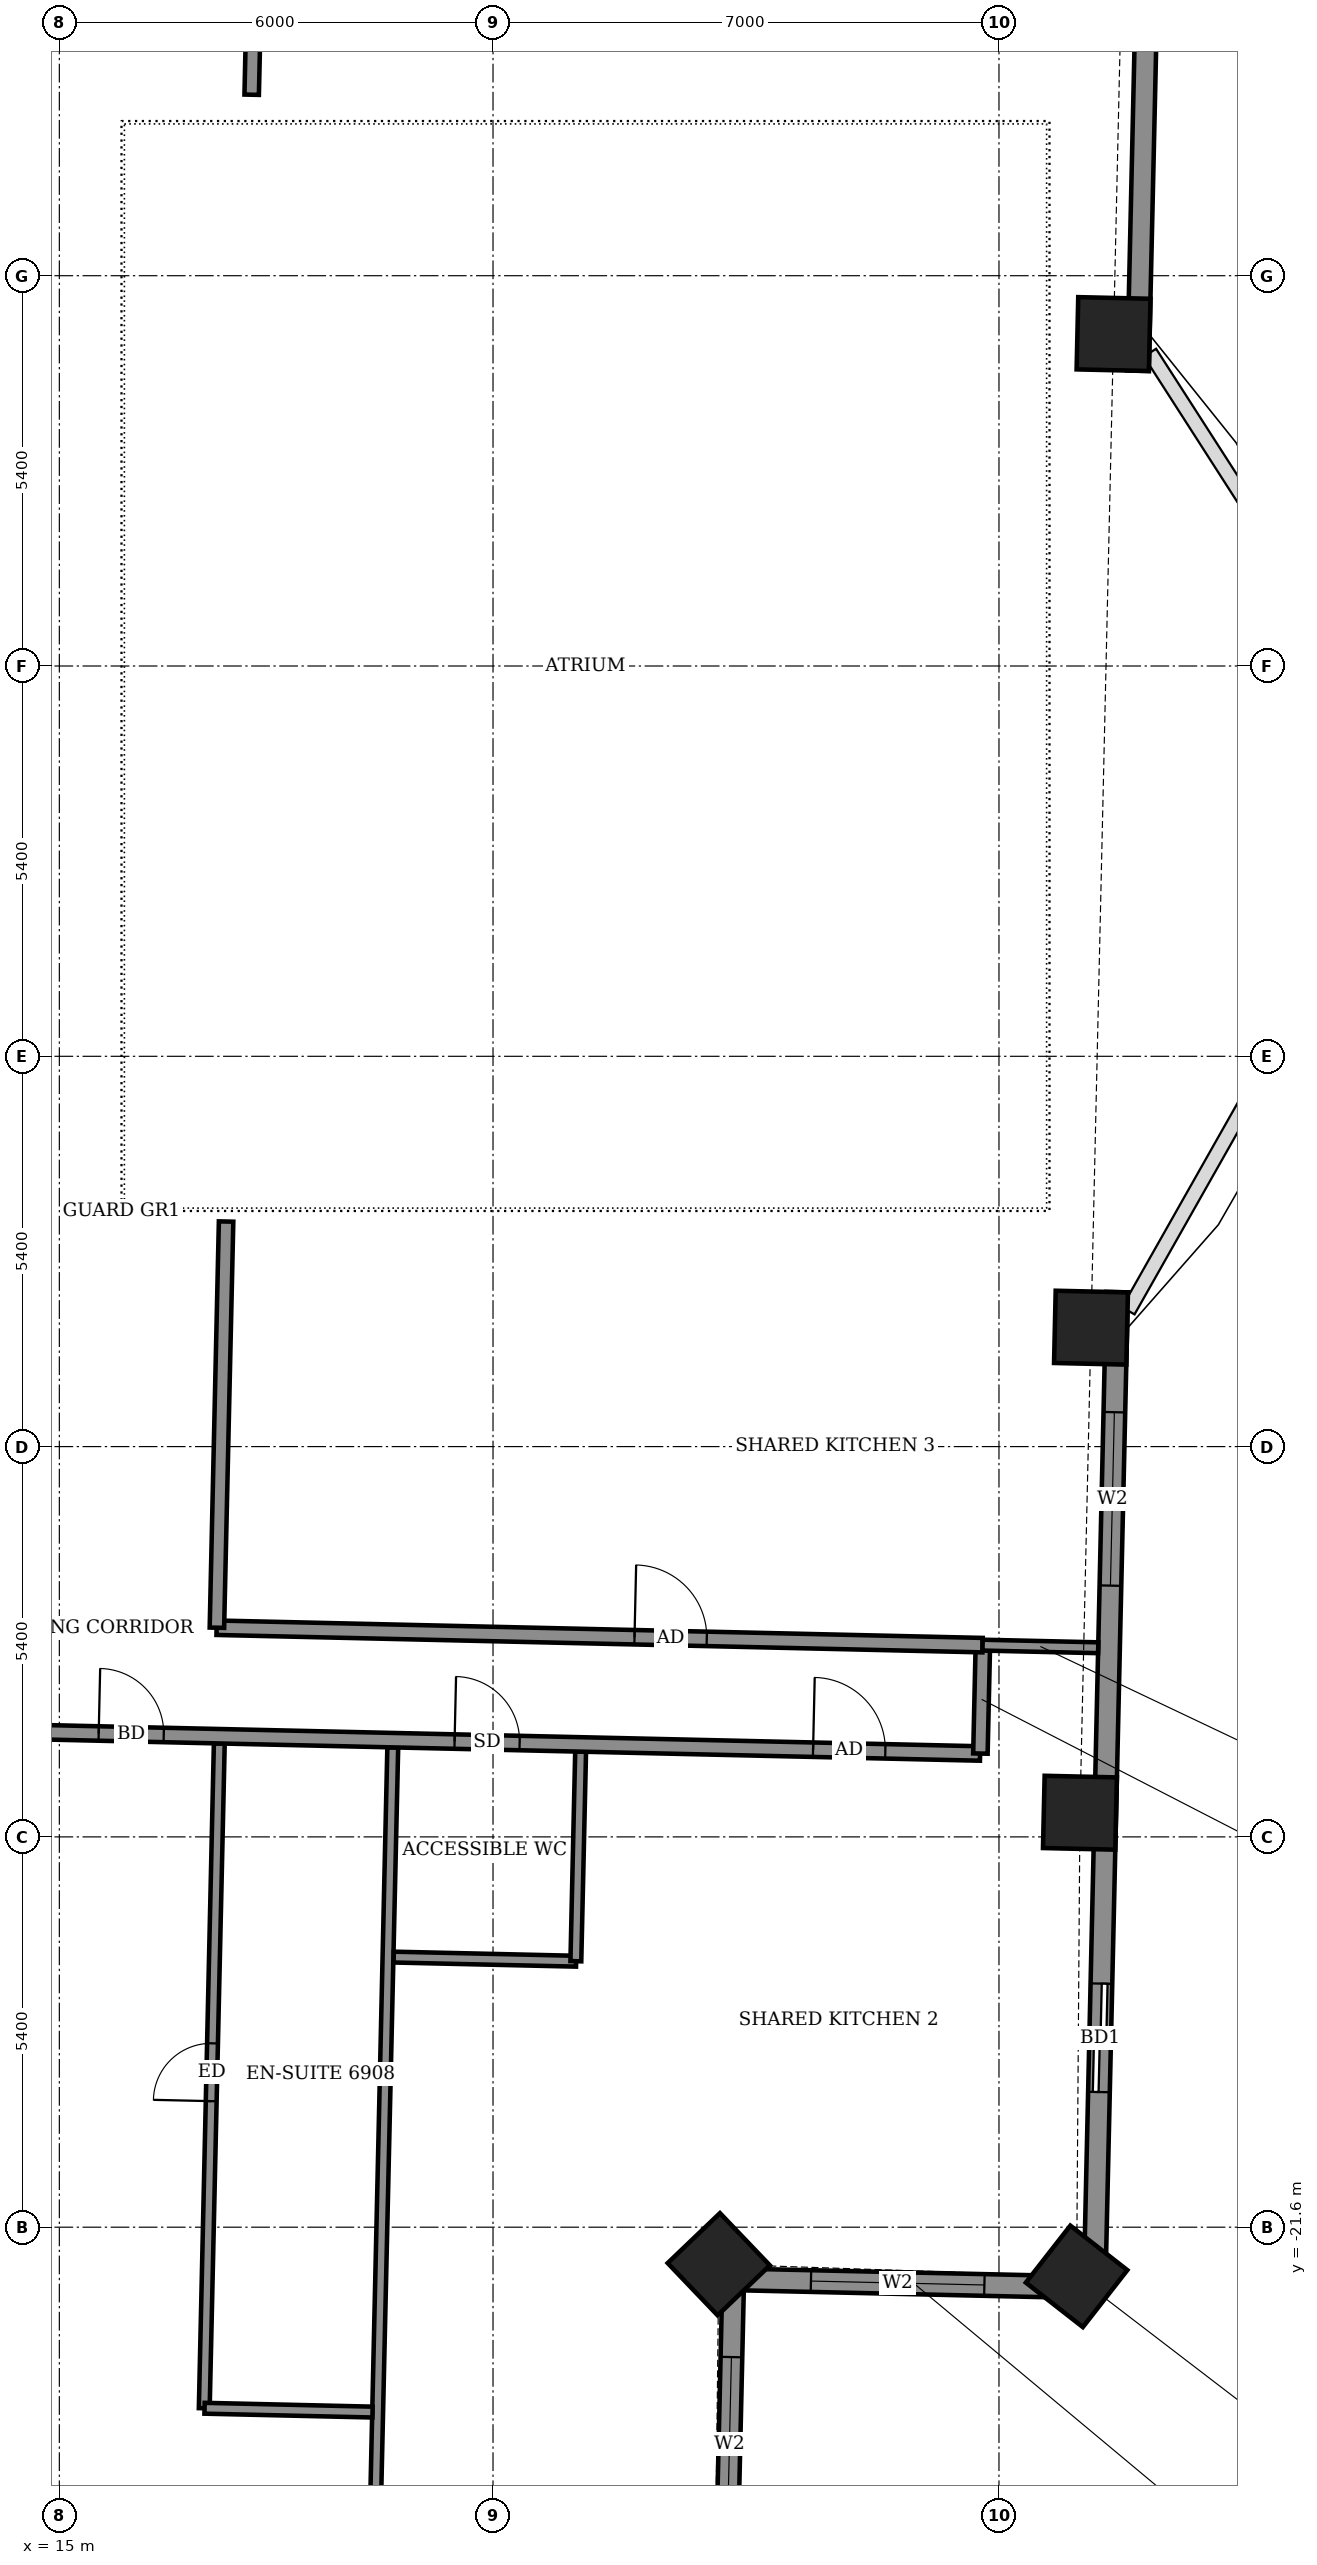
"""IFC4 building model, lengths in metres.
Left out: names, types, materials, properties, quantities, classifications, styles, units other than length and angle.
Written with IfcOpenShell. Run it as: python <this file> out.ifc"""

import sys

from ifc_helpers import new_model, si_unit, direction, frame, frame_2d, origin, origin_2d, place, context, subcontext, project, spatial, rectangle, extrude, element, fill, save


model = new_model("IFC4")
c1 = context("Model", 3, precision=1e-05, world=origin(), true_north=direction((0.0, 1.0)))
c2 = subcontext(c1, "Body", "Model", "MODEL_VIEW")
j1 = project(units=[si_unit("LENGTHUNIT", "METRE"), si_unit("PLANEANGLEUNIT", "RADIAN")], contexts=[c1])
p1 = place(None, origin())
s1 = spatial("IfcSite", under=j1, at=p1, CompositionType="ELEMENT")
p2 = place(p1, origin())
s2 = spatial("IfcBuilding", under=s1, at=p2, CompositionType="ELEMENT")
p3 = place(p2, frame((0.0, 0.0, 271.7)))
s3 = spatial("IfcBuildingStorey", under=s2, at=p3, CompositionType="ELEMENT", Elevation=271.7)
for number, where, z_axis, x_axis in (
    (1, (24.124, -22.113, -0.55), (0.0, 0.0, 1.0), (0.723, 0.691, 0.0)),
    (2, (29.074, -22.28, -0.55), (0.0, 0.0, 1.0), (0.615, 0.788, 0.0)),
    (3, (29.12, -15.866, -0.55), (0.0, 0.0, 1.0), (0.023, 1.0, 0.0)),
    (4, (29.273, -9.155, -0.55), (0.0, 0.0, 1.0), (0.023, 1.0, 0.0)),
    (5, (29.585, 4.592, -0.55), (0.0, 0.0, 1.0), (0.023, 1.0, 0.0)),
):
    element("IfcColumn", number, at=place(p3, frame(where, z_axis=z_axis, x_axis=x_axis)), inside=s3, PredefinedType="COLUMN", context=c2, shape_type="SweptSolid", body=[
        extrude(rectangle(XDim=1.0, YDim=1.0, at=origin_2d()), origin(), (0.0, 0.0, 1.0), 3.6),
    ])
p4 = place(p3, frame((29.322, -22.434, 0.0), z_axis=(0.0, 0.0, 1.0), x_axis=(0.022651350875, 0.999743425236, 0.0)))
e6 = element("IfcWall", 6, at=p4, inside=s3, PredefinedType="SOLIDWALL", context=c2, shape_type="SweptSolid", body=[
    extrude(rectangle(XDim=13.774, YDim=0.3, at=frame_2d((6.887, 0.0))), origin(), (0.0, 0.0, 1.0), 2.55),
])
p5 = place(p4, frame((2.705, 0.0, 0.0)))
e7 = element("IfcOpeningElement", 7, at=p5, cuts=e6, PredefinedType="OPENING", context=c2, shape_type="SweptSolid", body=[
    extrude(rectangle(XDim=1.5, YDim=2.4, at=frame_2d((0.75, 1.2))), frame((0.0, 0.16, 0.0), z_axis=(0.0, -1.0, 0.0), x_axis=(1.0, 0.0, 0.0)), (0.0, 0.0, 1.0), 0.32),
])
p6 = place(p4, frame((9.713, 0.0, 0.9)))
e8 = element("IfcOpeningElement", 8, at=p6, cuts=e6, PredefinedType="OPENING", context=c2, shape_type="SweptSolid", body=[
    extrude(rectangle(XDim=2.4, YDim=1.5, at=frame_2d((1.2, 0.75))), frame((0.0, 0.16, 0.0), z_axis=(0.0, -1.0, 0.0), x_axis=(1.0, 0.0, 0.0)), (0.0, 0.0, 1.0), 0.32),
])
p7 = place(p3, frame((29.923, 4.085, 0.0), z_axis=(0.0, 0.0, 1.0), x_axis=(0.022738672774, 0.999741442954, 0.0)))
e9 = element("IfcWall", 9, at=p7, inside=s3, PredefinedType="SOLIDWALL", context=c2, shape_type="SweptSolid", body=[
    extrude(rectangle(XDim=14.774, YDim=0.3, at=frame_2d((7.387, 0.0))), origin(), (0.0, 0.0, 1.0), 2.55),
])
p8 = place(p7, frame((4.853, 0.0, 0.0)))
e10 = element("IfcOpeningElement", 10, at=p8, cuts=e9, PredefinedType="OPENING", context=c2, shape_type="SweptSolid", body=[
    extrude(rectangle(XDim=1.5, YDim=2.4, at=frame_2d((0.75, 1.2))), frame((0.0, 0.16, 0.0), z_axis=(0.0, -1.0, 0.0), x_axis=(1.0, 0.0, 0.0)), (0.0, 0.0, 1.0), 0.32),
])
p9 = place(p7, frame((10.538, 0.0, 0.9)))
e11 = element("IfcOpeningElement", 11, at=p9, cuts=e9, PredefinedType="OPENING", context=c2, shape_type="SweptSolid", body=[
    extrude(rectangle(XDim=2.4, YDim=1.5, at=frame_2d((1.2, 0.75))), frame((0.0, 0.16, 0.0), z_axis=(0.0, -1.0, 0.0), x_axis=(1.0, 0.0, 0.0)), (0.0, 0.0, 1.0), 0.32),
])
p10 = place(p3, frame((24.209, -27.32, 0.0), z_axis=(0.0, 0.0, 1.0), x_axis=(0.022801259434, 0.999740017489, 0.0)))
e12 = element("IfcWall", 12, at=p10, inside=s3, PredefinedType="SOLIDWALL", context=c2, shape_type="SweptSolid", body=[
    extrude(rectangle(XDim=5.0, YDim=0.3, at=frame_2d((2.5, 0.0))), origin(), (0.0, 0.0, 1.0), 2.55),
])
p11 = place(p10, frame((1.524, 0.0, 0.9)))
e13 = element("IfcOpeningElement", 13, at=p11, cuts=e12, PredefinedType="OPENING", context=c2, shape_type="SweptSolid", body=[
    extrude(rectangle(XDim=2.4, YDim=1.5, at=frame_2d((1.2, 0.75))), frame((0.0, 0.16, 0.0), z_axis=(0.0, -1.0, 0.0), x_axis=(1.0, 0.0, 0.0)), (0.0, 0.0, 1.0), 0.32),
])
p12 = place(p3, frame((24.323, -22.321, 0.0), z_axis=(0.0, 0.0, 1.0), x_axis=(0.999744450377, -0.022606059803, 0.0)))
e14 = element("IfcWall", 14, at=p12, inside=s3, PredefinedType="SOLIDWALL", context=c2, shape_type="SweptSolid", body=[
    extrude(rectangle(XDim=5.0, YDim=0.3, at=frame_2d((2.5, 0.0))), origin(), (0.0, 0.0, 1.0), 2.55),
])
p13 = place(p12, frame((1.076, 0.0, 0.9)))
e15 = element("IfcOpeningElement", 15, at=p13, cuts=e14, PredefinedType="OPENING", context=c2, shape_type="SweptSolid", body=[
    extrude(rectangle(XDim=2.4, YDim=1.5, at=frame_2d((1.2, 0.75))), frame((0.0, 0.16, 0.0), z_axis=(0.0, -1.0, 0.0), x_axis=(1.0, 0.0, 0.0)), (0.0, 0.0, 1.0), 0.32),
])
p14 = place(p3, frame((19.338, -27.059, 0.0), z_axis=(0.0, 0.0, 1.0), x_axis=(0.022738821441, 0.999741439573, 0.0)))
e16 = element("IfcWall", 16, at=p14, inside=s3, PredefinedType="PARTITIONING", context=c2, shape_type="SweptSolid", body=[
    extrude(rectangle(XDim=12.1, YDim=0.15, at=frame_2d((6.05, 0.0))), origin(), (0.0, 0.0, 1.0), 2.55),
])
p15 = place(p3, frame((17.005, -24.105, 0.0), z_axis=(0.0, 0.0, 1.0), x_axis=(0.022611084784, 0.999744336741, 0.0)))
e17 = element("IfcWall", 17, at=p15, inside=s3, PredefinedType="PARTITIONING", context=c2, shape_type="SweptSolid", body=[
    extrude(rectangle(XDim=9.199, YDim=0.15, at=frame_2d((4.6, 0.0))), origin(), (0.0, 0.0, 1.0), 3.05),
])
p16 = place(p15, frame((4.25, 0.0, 0.0)))
e18 = element("IfcOpeningElement", 18, at=p16, cuts=e17, PredefinedType="OPENING", context=c2, shape_type="SweptSolid", body=[
    extrude(rectangle(XDim=0.8, YDim=2.1, at=frame_2d((0.4, 1.05))), frame((0.0, 0.085, 0.0), z_axis=(0.0, -1.0, 0.0), x_axis=(1.0, 0.0, 0.0)), (0.0, 0.0, 1.0), 0.17),
])
p17 = place(p3, frame((17.009, -24.105, 0.0), z_axis=(0.0, 0.0, 1.0), x_axis=(0.999740260747, -0.02279059109, 0.0)))
e19 = element("IfcWall", 19, at=p17, inside=s3, PredefinedType="PARTITIONING", context=c2, shape_type="SweptSolid", body=[
    extrude(rectangle(XDim=2.324, YDim=0.15, at=frame_2d((1.162, 0.0))), origin(), (0.0, 0.0, 1.0), 3.05),
])
p18 = place(p3, frame((19.626, -17.863, 0.0), z_axis=(0.0, 0.0, 1.0), x_axis=(0.9997461113, -0.022532486354, 0.0)))
e20 = element("IfcWall", 20, at=p18, inside=s3, PredefinedType="PARTITIONING", context=c2, shape_type="SweptSolid", body=[
    extrude(rectangle(XDim=2.525, YDim=0.15, at=frame_2d((1.262, 0.0))), origin(), (0.0, 0.0, 1.0), 3.05),
])
p19 = place(p3, frame((22.146, -17.92, 0.0), z_axis=(0.0, 0.0, 1.0), x_axis=(0.022732880677, 0.999741574676, 0.0)))
e21 = element("IfcWall", 21, at=p19, inside=s3, PredefinedType="PARTITIONING", context=c2, shape_type="SweptSolid", body=[
    extrude(rectangle(XDim=2.9, YDim=0.15, at=frame_2d((1.45, 0.0))), origin(), (0.0, 0.0, 1.0), 3.05),
])
p20 = place(p3, frame((-25.12, -13.847, 0.0), z_axis=(0.0, 0.0, 1.0), x_axis=(0.999742852445, -0.022676617578, 0.0)))
e22 = element("IfcWall", 22, at=p20, inside=s3, PredefinedType="PARTITIONING", context=c2, shape_type="SweptSolid", body=[
    extrude(rectangle(XDim=52.873, YDim=0.2, at=frame_2d((26.437, 0.0))), origin(), (0.0, 0.0, 1.0), 3.05),
])
p21 = place(p20, frame((2.43, 0.0, 0.0)))
e23 = element("IfcOpeningElement", 23, at=p21, cuts=e22, PredefinedType="OPENING", context=c2, shape_type="SweptSolid", body=[
    extrude(rectangle(XDim=1.0, YDim=2.1, at=frame_2d((0.5, 1.05))), frame((0.0, 0.11, 0.0), z_axis=(0.0, -1.0, 0.0), x_axis=(1.0, 0.0, 0.0)), (0.0, 0.0, 1.0), 0.22),
])
p22 = place(p20, frame((10.325, 0.0, 0.0)))
e24 = element("IfcOpeningElement", 24, at=p22, cuts=e22, PredefinedType="OPENING", context=c2, shape_type="SweptSolid", body=[
    extrude(rectangle(XDim=0.9, YDim=2.1, at=frame_2d((0.45, 1.05))), frame((0.0, 0.11, 0.0), z_axis=(0.0, -1.0, 0.0), x_axis=(1.0, 0.0, 0.0)), (0.0, 0.0, 1.0), 0.22),
])
p23 = place(p20, frame((12.575, 0.0, 0.0)))
e25 = element("IfcOpeningElement", 25, at=p23, cuts=e22, PredefinedType="OPENING", context=c2, shape_type="SweptSolid", body=[
    extrude(rectangle(XDim=0.9, YDim=2.1, at=frame_2d((0.45, 1.05))), frame((0.0, 0.11, 0.0), z_axis=(0.0, -1.0, 0.0), x_axis=(1.0, 0.0, 0.0)), (0.0, 0.0, 1.0), 0.22),
])
p24 = place(p20, frame((19.45, 0.0, 0.0)))
e26 = element("IfcOpeningElement", 26, at=p24, cuts=e22, PredefinedType="OPENING", context=c2, shape_type="SweptSolid", body=[
    extrude(rectangle(XDim=0.9, YDim=2.1, at=frame_2d((0.45, 1.05))), frame((0.0, 0.11, 0.0), z_axis=(0.0, -1.0, 0.0), x_axis=(1.0, 0.0, 0.0)), (0.0, 0.0, 1.0), 0.22),
])
p25 = place(p20, frame((21.625, 0.0, 0.0)))
e27 = element("IfcOpeningElement", 27, at=p25, cuts=e22, PredefinedType="OPENING", context=c2, shape_type="SweptSolid", body=[
    extrude(rectangle(XDim=0.9, YDim=2.1, at=frame_2d((0.45, 1.05))), frame((0.0, 0.11, 0.0), z_axis=(0.0, -1.0, 0.0), x_axis=(1.0, 0.0, 0.0)), (0.0, 0.0, 1.0), 0.22),
])
p26 = place(p20, frame((28.575, 0.0, 0.0)))
e28 = element("IfcOpeningElement", 28, at=p26, cuts=e22, PredefinedType="OPENING", context=c2, shape_type="SweptSolid", body=[
    extrude(rectangle(XDim=0.9, YDim=2.1, at=frame_2d((0.45, 1.05))), frame((0.0, 0.11, 0.0), z_axis=(0.0, -1.0, 0.0), x_axis=(1.0, 0.0, 0.0)), (0.0, 0.0, 1.0), 0.22),
])
p27 = place(p20, frame((30.875, 0.0, 0.0)))
e29 = element("IfcOpeningElement", 29, at=p27, cuts=e22, PredefinedType="OPENING", context=c2, shape_type="SweptSolid", body=[
    extrude(rectangle(XDim=0.9, YDim=2.1, at=frame_2d((0.45, 1.05))), frame((0.0, 0.11, 0.0), z_axis=(0.0, -1.0, 0.0), x_axis=(1.0, 0.0, 0.0)), (0.0, 0.0, 1.0), 0.22),
])
p28 = place(p20, frame((38.175, 0.0, 0.0)))
e30 = element("IfcOpeningElement", 30, at=p28, cuts=e22, PredefinedType="OPENING", context=c2, shape_type="SweptSolid", body=[
    extrude(rectangle(XDim=0.9, YDim=2.1, at=frame_2d((0.45, 1.05))), frame((0.0, 0.11, 0.0), z_axis=(0.0, -1.0, 0.0), x_axis=(1.0, 0.0, 0.0)), (0.0, 0.0, 1.0), 0.22),
])
p29 = place(p20, frame((40.675, 0.0, 0.0)))
e31 = element("IfcOpeningElement", 31, at=p29, cuts=e22, PredefinedType="OPENING", context=c2, shape_type="SweptSolid", body=[
    extrude(rectangle(XDim=0.9, YDim=2.1, at=frame_2d((0.45, 1.05))), frame((0.0, 0.11, 0.0), z_axis=(0.0, -1.0, 0.0), x_axis=(1.0, 0.0, 0.0)), (0.0, 0.0, 1.0), 0.22),
])
p30 = place(p20, frame((50.561, 0.0, 0.0)))
e32 = element("IfcOpeningElement", 32, at=p30, cuts=e22, PredefinedType="OPENING", context=c2, shape_type="SweptSolid", body=[
    extrude(rectangle(XDim=1.0, YDim=2.1, at=frame_2d((0.5, 1.05))), frame((0.0, 0.11, 0.0), z_axis=(0.0, -1.0, 0.0), x_axis=(1.0, 0.0, 0.0)), (0.0, 0.0, 1.0), 0.22),
])
p31 = place(p20, frame((45.6, 0.0, 0.0)))
e33 = element("IfcOpeningElement", 33, at=p31, cuts=e22, PredefinedType="OPENING", context=c2, shape_type="SweptSolid", body=[
    extrude(rectangle(XDim=0.9, YDim=2.1, at=frame_2d((0.45, 1.05))), frame((0.0, 0.11, 0.0), z_axis=(0.0, -1.0, 0.0), x_axis=(1.0, 0.0, 0.0)), (0.0, 0.0, 1.0), 0.22),
])
p32 = place(p3, frame((27.743, -15.047, 0.0), z_axis=(0.0, 0.0, 1.0), x_axis=(0.022780545013, 0.999740489712, 0.0)))
e34 = element("IfcWall", 34, at=p32, inside=s3, PredefinedType="PARTITIONING", context=c2, shape_type="SweptSolid", body=[
    extrude(rectangle(XDim=1.5, YDim=0.2, at=frame_2d((0.75, 0.0))), origin(), (0.0, 0.0, 1.0), 3.05),
])
p33 = place(p3, frame((17.176, -13.306, 0.0), z_axis=(0.0, 0.0, 1.0), x_axis=(0.999741038234, -0.022756459988, 0.0)))
e35 = element("IfcWall", 35, at=p33, inside=s3, PredefinedType="PARTITIONING", context=c2, shape_type="SweptSolid", body=[
    extrude(rectangle(XDim=10.6, YDim=0.2, at=frame_2d((5.3, 0.0))), origin(), (0.0, 0.0, 1.0), 3.05),
])
p34 = place(p33, frame((5.783, 0.0, 0.0)))
e36 = element("IfcOpeningElement", 36, at=p34, cuts=e35, PredefinedType="OPENING", context=c2, shape_type="SweptSolid", body=[
    extrude(rectangle(XDim=1.0, YDim=2.1, at=frame_2d((0.5, 1.05))), frame((0.0, 0.11, 0.0), z_axis=(0.0, -1.0, 0.0), x_axis=(1.0, 0.0, 0.0)), (0.0, 0.0, 1.0), 0.22),
])
p35 = place(p3, frame((17.18, -13.306, 0.0), z_axis=(0.0, 0.0, 1.0), x_axis=(0.022584272568, 0.999744942789, 0.0)))
e37 = element("IfcWall", 37, at=p35, inside=s3, PredefinedType="PARTITIONING", context=c2, shape_type="SweptSolid", body=[
    extrude(rectangle(XDim=5.621, YDim=0.2, at=frame_2d((2.811, 0.0))), origin(), (0.0, 0.0, 1.0), 3.05),
])
p36 = place(p3, frame((27.773, -13.547, 0.0), z_axis=(0.0, 0.0, 1.0), x_axis=(0.999748563699, -0.022423411484, 0.0)))
e38 = element("IfcWall", 38, at=p36, inside=s3, PredefinedType="PARTITIONING", context=c2, shape_type="SweptSolid", body=[
    extrude(rectangle(XDim=1.601, YDim=0.15, at=frame_2d((0.8, 0.0))), origin(), (0.0, 0.0, 1.0), 2.55),
])
p37 = place(p3, frame((17.661, 7.904, 0.0), z_axis=(0.0, 0.0, 1.0), x_axis=(0.022718785711, 0.999741895079, 0.0)))
e39 = element("IfcWall", 39, at=p37, inside=s3, PredefinedType="PARTITIONING", context=c2, shape_type="SweptSolid", body=[
    extrude(rectangle(XDim=4.234, YDim=0.2, at=frame_2d((2.117, 0.0))), origin(), (0.0, 0.0, 1.0), 3.05),
])
p38 = place(p5, origin())
e40 = element("IfcDoor", 40, at=p38, inside=s3, OperationType="SLIDING_TO_LEFT", PredefinedType="DOOR", context=c2, shape_type="SweptSolid", body=[
    extrude(rectangle(XDim=1.5, YDim=2.4, at=frame_2d((0.75, 1.2))), frame((0.0, 0.025, 0.0), z_axis=(0.0, -1.0, 0.0), x_axis=(1.0, 0.0, 0.0)), (0.0, 0.0, 1.0), 0.05),
])
fill(e7, e40)
p39 = place(p6, origin())
e41 = element("IfcWindow", 41, at=p39, inside=s3, PartitioningType="DOUBLE_PANEL_VERTICAL", PredefinedType="WINDOW", context=c2, shape_type="SweptSolid", body=[
    extrude(rectangle(XDim=2.4, YDim=1.5, at=frame_2d((1.2, 0.75))), frame((0.0, 0.03, 0.0), z_axis=(0.0, -1.0, 0.0), x_axis=(1.0, 0.0, 0.0)), (0.0, 0.0, 1.0), 0.06),
])
fill(e8, e41)
p40 = place(p11, origin())
e42 = element("IfcWindow", 42, at=p40, inside=s3, PartitioningType="DOUBLE_PANEL_VERTICAL", PredefinedType="WINDOW", context=c2, shape_type="SweptSolid", body=[
    extrude(rectangle(XDim=2.4, YDim=1.5, at=frame_2d((1.2, 0.75))), frame((0.0, 0.03, 0.0), z_axis=(0.0, -1.0, 0.0), x_axis=(1.0, 0.0, 0.0)), (0.0, 0.0, 1.0), 0.06),
])
fill(e13, e42)
p41 = place(p13, origin())
e43 = element("IfcWindow", 43, at=p41, inside=s3, PartitioningType="DOUBLE_PANEL_VERTICAL", PredefinedType="WINDOW", context=c2, shape_type="SweptSolid", body=[
    extrude(rectangle(XDim=2.4, YDim=1.5, at=frame_2d((1.2, 0.75))), frame((0.0, 0.03, 0.0), z_axis=(0.0, -1.0, 0.0), x_axis=(1.0, 0.0, 0.0)), (0.0, 0.0, 1.0), 0.06),
])
fill(e15, e43)
p42 = place(p29, origin())
e44 = element("IfcDoor", 44, at=p42, inside=s3, OperationType="SINGLE_SWING_RIGHT", PredefinedType="DOOR", context=c2, shape_type="SweptSolid", body=[
    extrude(rectangle(XDim=0.9, YDim=2.1, at=frame_2d((0.45, 1.05))), frame((0.0, 0.025, 0.0), z_axis=(0.0, -1.0, 0.0), x_axis=(1.0, 0.0, 0.0)), (0.0, 0.0, 1.0), 0.05),
])
fill(e31, e44)
p43 = place(p16, origin())
e45 = element("IfcDoor", 45, at=p43, inside=s3, OperationType="SINGLE_SWING_RIGHT", PredefinedType="DOOR", context=c2, shape_type="SweptSolid", body=[
    extrude(rectangle(XDim=0.8, YDim=2.1, at=frame_2d((0.4, 1.05))), frame((0.0, 0.025, 0.0), z_axis=(0.0, -1.0, 0.0), x_axis=(1.0, 0.0, 0.0)), (0.0, 0.0, 1.0), 0.05),
])
fill(e18, e45)
p44 = place(p30, origin())
e46 = element("IfcDoor", 46, at=p44, inside=s3, OperationType="SINGLE_SWING_RIGHT", PredefinedType="DOOR", context=c2, shape_type="SweptSolid", body=[
    extrude(rectangle(XDim=1.0, YDim=2.1, at=frame_2d((0.5, 1.05))), frame((0.0, 0.025, 0.0), z_axis=(0.0, -1.0, 0.0), x_axis=(1.0, 0.0, 0.0)), (0.0, 0.0, 1.0), 0.05),
])
fill(e32, e46)
p45 = place(p31, origin())
e47 = element("IfcDoor", 47, at=p45, inside=s3, OperationType="SINGLE_SWING_LEFT", PredefinedType="DOOR", context=c2, shape_type="SweptSolid", body=[
    extrude(rectangle(XDim=0.9, YDim=2.1, at=frame_2d((0.45, 1.05))), frame((0.0, 0.025, 0.0), z_axis=(0.0, -1.0, 0.0), x_axis=(1.0, 0.0, 0.0)), (0.0, 0.0, 1.0), 0.05),
])
fill(e33, e47)
p46 = place(p34, origin())
e48 = element("IfcDoor", 48, at=p46, inside=s3, OperationType="SINGLE_SWING_LEFT", PredefinedType="DOOR", context=c2, shape_type="SweptSolid", body=[
    extrude(rectangle(XDim=1.0, YDim=2.1, at=frame_2d((0.5, 1.05))), frame((0.0, 0.025, 0.0), z_axis=(0.0, -1.0, 0.0), x_axis=(1.0, 0.0, 0.0)), (0.0, 0.0, 1.0), 0.05),
])
fill(e36, e48)
save(model, sys.argv[1])
